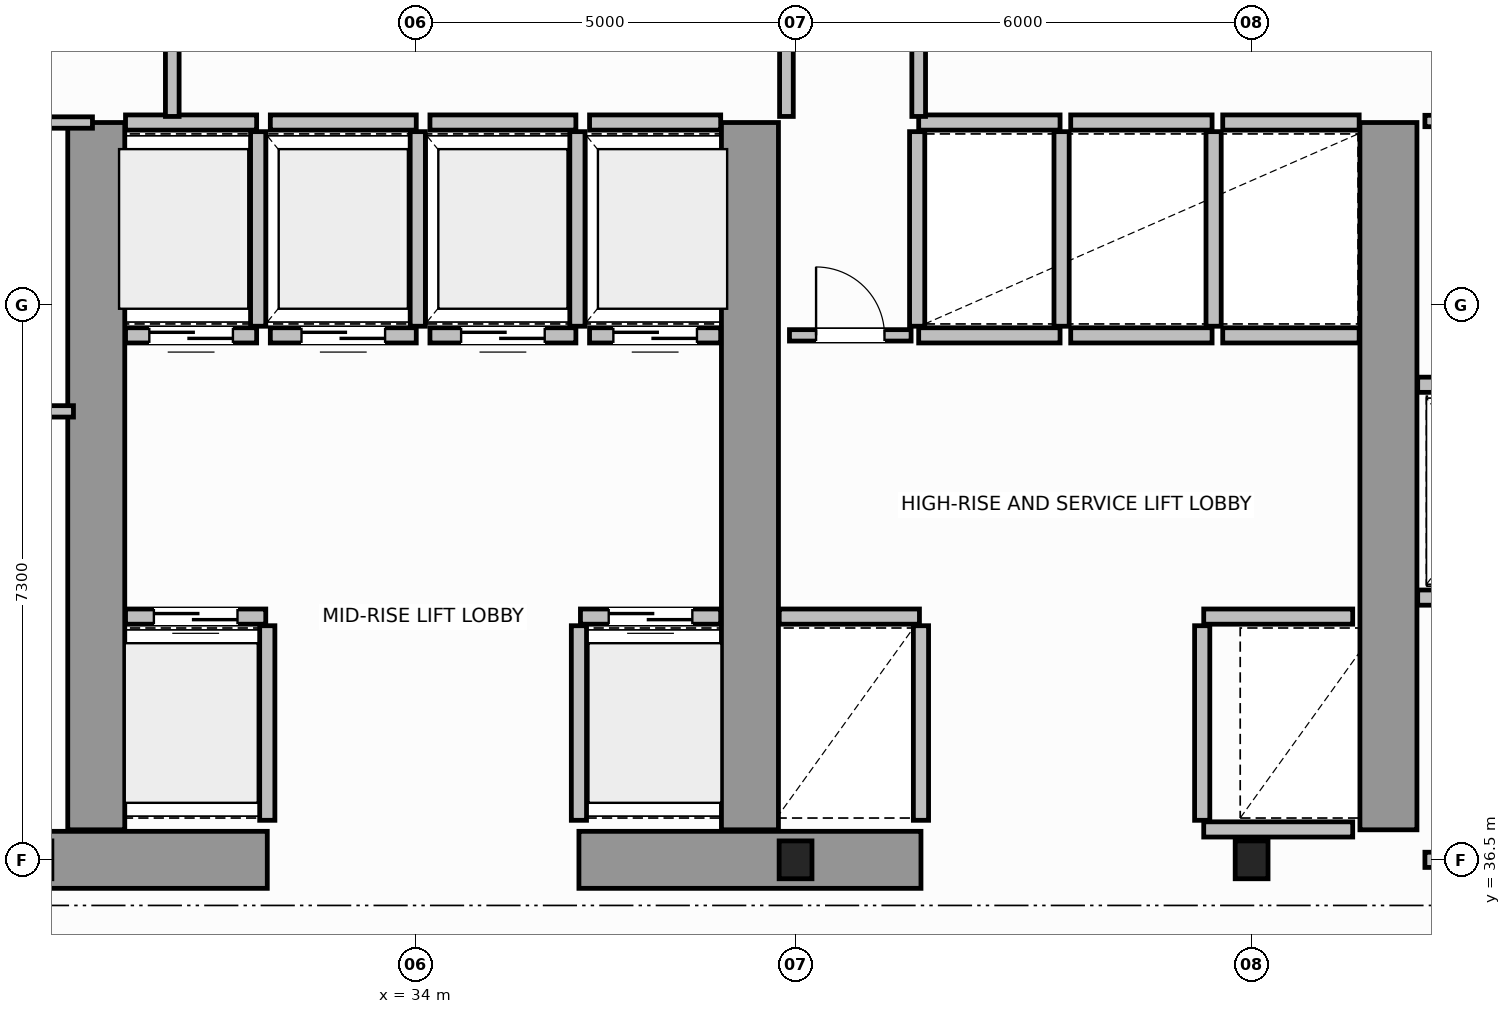
"""IFC4 building model, lengths in metres.
Left out: names, types, materials, properties, quantities, classifications, styles, units other than length and angle.
Written with IfcOpenShell. Run it as: python <this file> out.ifc"""

import sys

from ifc_helpers import new_model, si_unit, direction, frame, frame_2d, origin, origin_2d, place, context, subcontext, project, spatial, rectangle, i_section, extrude, source, transform, mapped, element, fill, save


model = new_model("IFC4")
c1 = context("Model", 3, precision=1e-05, world=origin(), true_north=direction((0.0, 1.0)))
c2 = subcontext(c1, "Body", "Model", "MODEL_VIEW")
j1 = project(units=[si_unit("LENGTHUNIT", "METRE"), si_unit("PLANEANGLEUNIT", "RADIAN")], contexts=[c1])
p1 = place(None, origin())
s1 = spatial("IfcSite", under=j1, at=p1, CompositionType="ELEMENT")
p2 = place(p1, origin())
s2 = spatial("IfcBuilding", under=s1, at=p2, CompositionType="ELEMENT")
p3 = place(p2, frame((0.0, 0.0, 153.8)))
s3 = spatial("IfcBuildingStorey", under=s2, at=p3, CompositionType="ELEMENT", Elevation=153.8)
m1 = source(origin(), c2, "Body", "SweptSolid", [
    extrude(i_section(OverallWidth=0.432, OverallDepth=0.498, WebThickness=0.055, FlangeThickness=0.068, FilletRadius=0.015, at=origin_2d()), origin(), (0.0, 0.0, 1.0), 3.8),
])
for number, where, z_axis, x_axis in (
    (1, (39.0, 36.5, 0.0), (0.0, 0.0, 1.0), (1.0, 0.0, 0.0)),
    (2, (45.0, 36.5, 0.0), (0.0, 0.0, 1.0), (1.0, 0.0, 0.0)),
):
    element("IfcColumn", number, at=place(p3, frame(where, z_axis=z_axis, x_axis=x_axis)), inside=s3, PredefinedType="COLUMN", context=c2, shape_type="MappedRepresentation", body=[
        mapped(m1, transform((0.0, 0.0, 0.0), scale=1.0)),
    ])
for number, where, z_axis, x_axis in (
    (3, (27.55, 36.5, 0.0), (0.0, 0.0, 1.0), (1.0, 0.0, 0.0)),
    (4, (36.15, 36.5, 0.0), (0.0, 0.0, 1.0), (1.0, 0.0, 0.0)),
):
    element("IfcWall", number, at=place(p3, frame(where, z_axis=z_axis, x_axis=x_axis)), inside=s3, PredefinedType="SHEAR", context=c2, shape_type="SweptSolid", body=[
        extrude(rectangle(XDim=4.5, YDim=0.75, at=frame_2d((2.25, 0.0))), origin(), (0.0, 0.0, 1.0), 3.8),
    ])
for number, where, z_axis, x_axis in (
    (5, (29.8, 36.895, 0.0), (0.0, 0.0, 1.0), (0.0, 1.0, 0.0)),
    (6, (38.4, 36.895, 0.0), (0.0, 0.0, 1.0), (0.0, 1.0, 0.0)),
    (7, (46.8, 36.895, 0.0), (0.0, 0.0, 1.0), (0.0, 1.0, 0.0)),
):
    element("IfcWall", number, at=place(p3, frame(where, z_axis=z_axis, x_axis=x_axis)), inside=s3, PredefinedType="SHEAR", context=c2, shape_type="SweptSolid", body=[
        extrude(rectangle(XDim=9.305, YDim=0.75, at=frame_2d((4.652, 0.0))), origin(), (0.0, 0.0, 1.0), 3.8),
    ])
p4 = place(p3, frame((47.28, 36.5, 0.0), z_axis=(0.0, 0.0, 1.0), x_axis=(1.0, 0.0, 0.0)))
e8 = element("IfcWall", 8, at=p4, inside=s3, PredefinedType="SOLIDWALL", context=c2, shape_type="SweptSolid", body=[
    extrude(rectangle(XDim=2.47, YDim=0.2, at=frame_2d((1.235, 0.0))), origin(), (0.0, 0.0, 1.0), 2.37),
])
p5 = place(p4, frame((0.65, 0.0, 0.0)))
e9 = element("IfcOpeningElement", 9, at=p5, cuts=e8, PredefinedType="OPENING", context=c2, shape_type="SweptSolid", body=[
    extrude(rectangle(XDim=1.1, YDim=2.15, at=frame_2d((0.55, 1.075))), frame((0.0, 0.11, 0.0), z_axis=(0.0, -1.0, 0.0), x_axis=(1.0, 0.0, 0.0)), (0.0, 0.0, 1.0), 0.22),
])
p6 = place(p3, frame((30.185, 39.7, 0.0), z_axis=(0.0, 0.0, 1.0), x_axis=(1.0, 0.0, 0.0)))
e10 = element("IfcWall", 10, at=p6, inside=s3, PredefinedType="SOLIDWALL", context=c2, shape_type="SweptSolid", body=[
    extrude(rectangle(XDim=1.845, YDim=0.2, at=frame_2d((0.922, 0.0))), origin(), (0.0, 0.0, 1.0), 3.58),
])
p7 = place(p6, frame((0.373, 0.0, 0.0)))
e11 = element("IfcOpeningElement", 11, at=p7, cuts=e10, PredefinedType="OPENING", context=c2, shape_type="SweptSolid", body=[
    extrude(rectangle(XDim=1.1, YDim=2.15, at=frame_2d((0.55, 1.075))), frame((0.0, 0.11, 0.0), z_axis=(0.0, -1.0, 0.0), x_axis=(1.0, 0.0, 0.0)), (0.0, 0.0, 1.0), 0.22),
])
p8 = place(p3, frame((32.05, 37.02, 0.0), z_axis=(0.0, 0.0, 1.0), x_axis=(0.0, 1.0, 0.0)))
e12 = element("IfcWall", 12, at=p8, inside=s3, PredefinedType="SOLIDWALL", context=c2, shape_type="SweptSolid", body=[
    extrude(rectangle(XDim=2.56, YDim=0.2, at=frame_2d((1.28, 0.0))), origin(), (0.0, 0.0, 1.0), 3.58),
])
p9 = place(p3, frame((36.17, 39.7, 0.0), z_axis=(0.0, 0.0, 1.0), x_axis=(1.0, 0.0, 0.0)))
e13 = element("IfcWall", 13, at=p9, inside=s3, PredefinedType="SOLIDWALL", context=c2, shape_type="SweptSolid", body=[
    extrude(rectangle(XDim=1.845, YDim=0.2, at=frame_2d((0.922, 0.0))), origin(), (0.0, 0.0, 1.0), 3.58),
])
p10 = place(p9, frame((0.372, 0.0, 0.0)))
e14 = element("IfcOpeningElement", 14, at=p10, cuts=e13, PredefinedType="OPENING", context=c2, shape_type="SweptSolid", body=[
    extrude(rectangle(XDim=1.1, YDim=2.15, at=frame_2d((0.55, 1.075))), frame((0.0, 0.11, 0.0), z_axis=(0.0, -1.0, 0.0), x_axis=(1.0, 0.0, 0.0)), (0.0, 0.0, 1.0), 0.22),
])
p11 = place(p3, frame((36.15, 37.02, 0.0), z_axis=(0.0, 0.0, 1.0), x_axis=(0.0, 1.0, 0.0)))
e15 = element("IfcWall", 15, at=p11, inside=s3, PredefinedType="SOLIDWALL", context=c2, shape_type="SweptSolid", body=[
    extrude(rectangle(XDim=2.56, YDim=0.2, at=frame_2d((1.28, 0.0))), origin(), (0.0, 0.0, 1.0), 3.58),
])
p12 = place(p3, frame((30.185, 43.4, 0.0), z_axis=(0.0, 0.0, 1.0), x_axis=(1.0, 0.0, 0.0)))
e16 = element("IfcWall", 16, at=p12, inside=s3, PredefinedType="SOLIDWALL", context=c2, shape_type="SweptSolid", body=[
    extrude(rectangle(XDim=1.725, YDim=0.2, at=frame_2d((0.862, 0.0))), origin(), (0.0, 0.0, 1.0), 3.58),
])
p13 = place(p12, frame((0.313, 0.0, 0.0)))
e17 = element("IfcOpeningElement", 17, at=p13, cuts=e16, PredefinedType="OPENING", context=c2, shape_type="SweptSolid", body=[
    extrude(rectangle(XDim=1.1, YDim=2.15, at=frame_2d((0.55, 1.075))), frame((0.0, 0.11, 0.0), z_axis=(0.0, -1.0, 0.0), x_axis=(1.0, 0.0, 0.0)), (0.0, 0.0, 1.0), 0.22),
])
p14 = place(p3, frame((30.185, 46.2, 0.0), z_axis=(0.0, 0.0, 1.0), x_axis=(1.0, 0.0, 0.0)))
e18 = element("IfcWall", 18, at=p14, inside=s3, PredefinedType="SOLIDWALL", context=c2, shape_type="SweptSolid", body=[
    extrude(rectangle(XDim=1.725, YDim=0.2, at=frame_2d((0.862, 0.0))), origin(), (0.0, 0.0, 1.0), 3.58),
])
p15 = place(p3, frame((31.93, 43.52, 0.0), z_axis=(0.0, 0.0, 1.0), x_axis=(0.0, 1.0, 0.0)))
e19 = element("IfcWall", 19, at=p15, inside=s3, PredefinedType="SOLIDWALL", context=c2, shape_type="SweptSolid", body=[
    extrude(rectangle(XDim=2.56, YDim=0.2, at=frame_2d((1.28, 0.0))), origin(), (0.0, 0.0, 1.0), 3.58),
])
p16 = place(p3, frame((32.09, 43.4, 0.0), z_axis=(0.0, 0.0, 1.0), x_axis=(1.0, 0.0, 0.0)))
e20 = element("IfcWall", 20, at=p16, inside=s3, PredefinedType="SOLIDWALL", context=c2, shape_type="SweptSolid", body=[
    extrude(rectangle(XDim=1.92, YDim=0.2, at=frame_2d((0.96, 0.0))), origin(), (0.0, 0.0, 1.0), 3.58),
])
p17 = place(p16, frame((0.41, 0.0, 0.0)))
e21 = element("IfcOpeningElement", 21, at=p17, cuts=e20, PredefinedType="OPENING", context=c2, shape_type="SweptSolid", body=[
    extrude(rectangle(XDim=1.1, YDim=2.15, at=frame_2d((0.55, 1.075))), frame((0.0, 0.11, 0.0), z_axis=(0.0, -1.0, 0.0), x_axis=(1.0, 0.0, 0.0)), (0.0, 0.0, 1.0), 0.22),
])
p18 = place(p3, frame((32.09, 46.2, 0.0), z_axis=(0.0, 0.0, 1.0), x_axis=(1.0, 0.0, 0.0)))
e22 = element("IfcWall", 22, at=p18, inside=s3, PredefinedType="SOLIDWALL", context=c2, shape_type="SweptSolid", body=[
    extrude(rectangle(XDim=1.92, YDim=0.2, at=frame_2d((0.96, 0.0))), origin(), (0.0, 0.0, 1.0), 3.58),
])
p19 = place(p3, frame((34.03, 43.52, 0.0), z_axis=(0.0, 0.0, 1.0), x_axis=(0.0, 1.0, 0.0)))
e23 = element("IfcWall", 23, at=p19, inside=s3, PredefinedType="SOLIDWALL", context=c2, shape_type="SweptSolid", body=[
    extrude(rectangle(XDim=2.56, YDim=0.2, at=frame_2d((1.28, 0.0))), origin(), (0.0, 0.0, 1.0), 3.58),
])
p20 = place(p3, frame((34.19, 43.4, 0.0), z_axis=(0.0, 0.0, 1.0), x_axis=(1.0, 0.0, 0.0)))
e24 = element("IfcWall", 24, at=p20, inside=s3, PredefinedType="SOLIDWALL", context=c2, shape_type="SweptSolid", body=[
    extrude(rectangle(XDim=1.92, YDim=0.2, at=frame_2d((0.96, 0.0))), origin(), (0.0, 0.0, 1.0), 3.58),
])
p21 = place(p20, frame((0.41, 0.0, 0.0)))
e25 = element("IfcOpeningElement", 25, at=p21, cuts=e24, PredefinedType="OPENING", context=c2, shape_type="SweptSolid", body=[
    extrude(rectangle(XDim=1.1, YDim=2.15, at=frame_2d((0.55, 1.075))), frame((0.0, 0.11, 0.0), z_axis=(0.0, -1.0, 0.0), x_axis=(1.0, 0.0, 0.0)), (0.0, 0.0, 1.0), 0.22),
])
p22 = place(p3, frame((34.19, 46.2, 0.0), z_axis=(0.0, 0.0, 1.0), x_axis=(1.0, 0.0, 0.0)))
e26 = element("IfcWall", 26, at=p22, inside=s3, PredefinedType="SOLIDWALL", context=c2, shape_type="SweptSolid", body=[
    extrude(rectangle(XDim=1.92, YDim=0.2, at=frame_2d((0.96, 0.0))), origin(), (0.0, 0.0, 1.0), 3.58),
])
p23 = place(p3, frame((36.13, 43.52, 0.0), z_axis=(0.0, 0.0, 1.0), x_axis=(0.0, 1.0, 0.0)))
e27 = element("IfcWall", 27, at=p23, inside=s3, PredefinedType="SOLIDWALL", context=c2, shape_type="SweptSolid", body=[
    extrude(rectangle(XDim=2.56, YDim=0.2, at=frame_2d((1.28, 0.0))), origin(), (0.0, 0.0, 1.0), 3.58),
])
p24 = place(p3, frame((36.29, 43.4, 0.0), z_axis=(0.0, 0.0, 1.0), x_axis=(1.0, 0.0, 0.0)))
e28 = element("IfcWall", 28, at=p24, inside=s3, PredefinedType="SOLIDWALL", context=c2, shape_type="SweptSolid", body=[
    extrude(rectangle(XDim=1.725, YDim=0.2, at=frame_2d((0.862, 0.0))), origin(), (0.0, 0.0, 1.0), 3.58),
])
p25 = place(p24, frame((0.313, 0.0, 0.0)))
e29 = element("IfcOpeningElement", 29, at=p25, cuts=e28, PredefinedType="OPENING", context=c2, shape_type="SweptSolid", body=[
    extrude(rectangle(XDim=1.1, YDim=2.15, at=frame_2d((0.55, 1.075))), frame((0.0, 0.11, 0.0), z_axis=(0.0, -1.0, 0.0), x_axis=(1.0, 0.0, 0.0)), (0.0, 0.0, 1.0), 0.22),
])
p26 = place(p3, frame((36.29, 46.2, 0.0), z_axis=(0.0, 0.0, 1.0), x_axis=(1.0, 0.0, 0.0)))
e30 = element("IfcWall", 30, at=p26, inside=s3, PredefinedType="SOLIDWALL", context=c2, shape_type="SweptSolid", body=[
    extrude(rectangle(XDim=1.725, YDim=0.2, at=frame_2d((0.862, 0.0))), origin(), (0.0, 0.0, 1.0), 3.58),
])
p27 = place(p3, frame((38.785, 39.7, 0.0), z_axis=(0.0, 0.0, 1.0), x_axis=(1.0, 0.0, 0.0)))
e31 = element("IfcWall", 31, at=p27, inside=s3, PredefinedType="SOLIDWALL", context=c2, shape_type="SweptSolid", body=[
    extrude(rectangle(XDim=1.845, YDim=0.2, at=frame_2d((0.922, 0.0))), origin(), (0.0, 0.0, 1.0), 3.58),
])
p28 = place(p3, frame((40.65, 37.02, 0.0), z_axis=(0.0, 0.0, 1.0), x_axis=(0.0, 1.0, 0.0)))
e32 = element("IfcWall", 32, at=p28, inside=s3, PredefinedType="SOLIDWALL", context=c2, shape_type="SweptSolid", body=[
    extrude(rectangle(XDim=2.56, YDim=0.2, at=frame_2d((1.28, 0.0))), origin(), (0.0, 0.0, 1.0), 3.58),
])
p29 = place(p3, frame((44.37, 39.7, 0.0), z_axis=(0.0, 0.0, 1.0), x_axis=(1.0, 0.0, 0.0)))
e33 = element("IfcWall", 33, at=p29, inside=s3, PredefinedType="SOLIDWALL", context=c2, shape_type="SweptSolid", body=[
    extrude(rectangle(XDim=1.96, YDim=0.2, at=frame_2d((0.98, 0.0))), origin(), (0.0, 0.0, 1.0), 3.58),
])
p30 = place(p3, frame((44.37, 36.9, 0.0), z_axis=(0.0, 0.0, 1.0), x_axis=(1.0, 0.0, 0.0)))
e34 = element("IfcWall", 34, at=p30, inside=s3, PredefinedType="SOLIDWALL", context=c2, shape_type="SweptSolid", body=[
    extrude(rectangle(XDim=1.96, YDim=0.2, at=frame_2d((0.98, 0.0))), origin(), (0.0, 0.0, 1.0), 2.37),
])
p31 = place(p3, frame((44.35, 37.02, 0.0), z_axis=(0.0, 0.0, 1.0), x_axis=(0.0, 1.0, 0.0)))
e35 = element("IfcWall", 35, at=p31, inside=s3, PredefinedType="SOLIDWALL", context=c2, shape_type="SweptSolid", body=[
    extrude(rectangle(XDim=2.56, YDim=0.2, at=frame_2d((1.28, 0.0))), origin(), (0.0, 0.0, 1.0), 3.58),
])
for number, where, z_axis, x_axis in (
    (36, (40.62, 43.4, 0.0), (0.0, 0.0, 1.0), (1.0, 0.0, 0.0)),
    (37, (40.62, 46.2, 0.0), (0.0, 0.0, 1.0), (1.0, 0.0, 0.0)),
):
    element("IfcWall", number, at=place(p3, frame(where, z_axis=z_axis, x_axis=x_axis)), inside=s3, PredefinedType="SOLIDWALL", context=c2, shape_type="SweptSolid", body=[
        extrude(rectangle(XDim=1.86, YDim=0.2, at=frame_2d((0.93, 0.0))), origin(), (0.0, 0.0, 1.0), 3.58),
    ])
for number, where, z_axis, x_axis in (
    (38, (40.6, 43.52, 0.0), (0.0, 0.0, 1.0), (0.0, 1.0, 0.0)),
    (39, (42.5, 43.52, 0.0), (0.0, 0.0, 1.0), (0.0, 1.0, 0.0)),
):
    element("IfcWall", number, at=place(p3, frame(where, z_axis=z_axis, x_axis=x_axis)), inside=s3, PredefinedType="SOLIDWALL", context=c2, shape_type="SweptSolid", body=[
        extrude(rectangle(XDim=2.56, YDim=0.2, at=frame_2d((1.28, 0.0))), origin(), (0.0, 0.0, 1.0), 3.58),
    ])
for number, where, z_axis, x_axis in (
    (40, (42.62, 43.4, 0.0), (0.0, 0.0, 1.0), (1.0, 0.0, 0.0)),
    (41, (42.62, 46.2, 0.0), (0.0, 0.0, 1.0), (1.0, 0.0, 0.0)),
):
    element("IfcWall", number, at=place(p3, frame(where, z_axis=z_axis, x_axis=x_axis)), inside=s3, PredefinedType="SOLIDWALL", context=c2, shape_type="SweptSolid", body=[
        extrude(rectangle(XDim=1.86, YDim=0.2, at=frame_2d((0.93, 0.0))), origin(), (0.0, 0.0, 1.0), 3.58),
    ])
p32 = place(p3, frame((44.5, 43.52, 0.0), z_axis=(0.0, 0.0, 1.0), x_axis=(0.0, 1.0, 0.0)))
e42 = element("IfcWall", 42, at=p32, inside=s3, PredefinedType="SOLIDWALL", context=c2, shape_type="SweptSolid", body=[
    extrude(rectangle(XDim=2.56, YDim=0.2, at=frame_2d((1.28, 0.0))), origin(), (0.0, 0.0, 1.0), 3.58),
])
for number, where, z_axis, x_axis in (
    (43, (44.62, 43.4, 0.0), (0.0, 0.0, 1.0), (1.0, 0.0, 0.0)),
    (44, (44.62, 46.2, 0.0), (0.0, 0.0, 1.0), (1.0, 0.0, 0.0)),
):
    element("IfcWall", number, at=place(p3, frame(where, z_axis=z_axis, x_axis=x_axis)), inside=s3, PredefinedType="SOLIDWALL", context=c2, shape_type="SweptSolid", body=[
        extrude(rectangle(XDim=1.795, YDim=0.2, at=frame_2d((0.897, 0.0))), origin(), (0.0, 0.0, 1.0), 3.58),
    ])
p33 = place(p3, frame((47.185, 39.95, 0.0), z_axis=(0.0, 0.0, 1.0), x_axis=(1.0, 0.0, 0.0)))
e45 = element("IfcWall", 45, at=p33, inside=s3, PredefinedType="SOLIDWALL", context=c2, shape_type="SweptSolid", body=[
    extrude(rectangle(XDim=2.145, YDim=0.2, at=frame_2d((1.073, 0.0))), origin(), (0.0, 0.0, 1.0), 3.58),
])
p34 = place(p33, frame((0.522, 0.0, 0.0)))
e46 = element("IfcOpeningElement", 46, at=p34, cuts=e45, PredefinedType="OPENING", context=c2, shape_type="SweptSolid", body=[
    extrude(rectangle(XDim=1.1, YDim=2.15, at=frame_2d((0.55, 1.075))), frame((0.0, 0.11, 0.0), z_axis=(0.0, -1.0, 0.0), x_axis=(1.0, 0.0, 0.0)), (0.0, 0.0, 1.0), 0.22),
])
p35 = place(p3, frame((47.185, 42.75, 0.0), z_axis=(0.0, 0.0, 1.0), x_axis=(1.0, 0.0, 0.0)))
e47 = element("IfcWall", 47, at=p35, inside=s3, PredefinedType="SOLIDWALL", context=c2, shape_type="SweptSolid", body=[
    extrude(rectangle(XDim=2.145, YDim=0.2, at=frame_2d((1.073, 0.0))), origin(), (0.0, 0.0, 1.0), 3.58),
])
p36 = place(p3, frame((21.25, 46.2, 0.0), z_axis=(0.0, 0.0, 1.0), x_axis=(1.0, 0.0, 0.0)))
e48 = element("IfcWall", 48, at=p36, inside=s3, PredefinedType="PARTITIONING", context=c2, shape_type="SweptSolid", body=[
    extrude(rectangle(XDim=8.5, YDim=0.15, at=frame_2d((4.25, 0.0))), origin(), (0.0, 0.0, 1.0), 3.58),
])
p37 = place(p3, frame((21.5, 42.4, 0.0), z_axis=(0.0, 0.0, 1.0), x_axis=(1.0, 0.0, 0.0)))
e49 = element("IfcWall", 49, at=p37, inside=s3, PredefinedType="PARTITIONING", context=c2, shape_type="SweptSolid", body=[
    extrude(rectangle(XDim=8.0, YDim=0.15, at=frame_2d((4.0, 0.0))), origin(), (0.0, 0.0, 1.0), 3.58),
])
p38 = place(p37, frame((3.4, 0.0, 0.0)))
e50 = element("IfcOpeningElement", 50, at=p38, cuts=e49, PredefinedType="OPENING", context=c2, shape_type="SweptSolid", body=[
    extrude(rectangle(XDim=0.9, YDim=2.1, at=frame_2d((0.45, 1.05))), frame((0.0, 0.085, 0.0), z_axis=(0.0, -1.0, 0.0), x_axis=(1.0, 0.0, 0.0)), (0.0, 0.0, 1.0), 0.17),
])
p39 = place(p3, frame((47.28, 46.22, 0.0), z_axis=(0.0, 0.0, 1.0), x_axis=(1.0, 0.0, 0.0)))
e51 = element("IfcWall", 51, at=p39, inside=s3, PredefinedType="PARTITIONING", context=c2, shape_type="SweptSolid", body=[
    extrude(rectangle(XDim=2.1, YDim=0.15, at=frame_2d((1.05, 0.0))), origin(), (0.0, 0.0, 1.0), 3.58),
])
p40 = place(p39, frame((0.55, 0.0, 0.0)))
e52 = element("IfcOpeningElement", 52, at=p40, cuts=e51, PredefinedType="OPENING", context=c2, shape_type="SweptSolid", body=[
    extrude(rectangle(XDim=0.9, YDim=2.1, at=frame_2d((0.45, 1.05))), frame((0.0, 0.085, 0.0), z_axis=(0.0, -1.0, 0.0), x_axis=(1.0, 0.0, 0.0)), (0.0, 0.0, 1.0), 0.17),
])
p41 = place(p3, frame((38.92, 43.4, 0.0), z_axis=(0.0, 0.0, 1.0), x_axis=(1.0, 0.0, 0.0)))
e53 = element("IfcWall", 53, at=p41, inside=s3, PredefinedType="PARTITIONING", context=c2, shape_type="SweptSolid", body=[
    extrude(rectangle(XDim=1.6, YDim=0.15, at=frame_2d((0.8, 0.0))), origin(), (0.0, 0.0, 1.0), 3.58),
])
p42 = place(p41, frame((0.35, 0.0, 0.0)))
e54 = element("IfcOpeningElement", 54, at=p42, cuts=e53, PredefinedType="OPENING", context=c2, shape_type="SweptSolid", body=[
    extrude(rectangle(XDim=0.9, YDim=2.1, at=frame_2d((0.45, 1.05))), frame((0.0, 0.085, 0.0), z_axis=(0.0, -1.0, 0.0), x_axis=(1.0, 0.0, 0.0)), (0.0, 0.0, 1.0), 0.17),
])
for number, where, z_axis, x_axis in (
    (55, (30.8, 46.28, 0.0), (0.0, 0.0, 1.0), (0.0, 1.0, 0.0)),
    (56, (38.88, 46.28, 0.0), (0.0, 0.0, 1.0), (0.0, 1.0, 0.0)),
):
    element("IfcWall", number, at=place(p3, frame(where, z_axis=z_axis, x_axis=x_axis)), inside=s3, PredefinedType="PLUMBINGWALL", context=c2, shape_type="SweptSolid", body=[
        extrude(rectangle(XDim=1.94, YDim=0.18, at=frame_2d((0.97, 0.0))), origin(), (0.0, 0.0, 1.0), 3.58),
    ])
p43 = place(p3, frame((40.62, 46.28, 0.0), z_axis=(0.0, 0.0, 1.0), x_axis=(0.0, 1.0, 0.0)))
e57 = element("IfcWall", 57, at=p43, inside=s3, PredefinedType="PLUMBINGWALL", context=c2, shape_type="SweptSolid", body=[
    extrude(rectangle(XDim=2.0, YDim=0.18, at=frame_2d((1.0, 0.0))), origin(), (0.0, 0.0, 1.0), 3.58),
])
m2 = source(origin(), c2, "Body", "SweptSolid", [
    extrude(rectangle(XDim=1.1, YDim=2.15, at=frame_2d((0.55, 1.075))), frame((0.0, 0.025, 0.0), z_axis=(0.0, -1.0, 0.0), x_axis=(1.0, 0.0, 0.0)), (0.0, 0.0, 1.0), 0.05),
])
p44 = place(p7, origin())
e58 = element("IfcDoor", 58, at=p44, inside=s3, OperationType="DOUBLE_DOOR_SLIDING", PredefinedType="DOOR", context=c2, shape_type="MappedRepresentation", body=[
    mapped(m2, transform((0.0, 0.0, 0.0), scale=1.0)),
])
fill(e11, e58)
p45 = place(p10, origin())
e59 = element("IfcDoor", 59, at=p45, inside=s3, OperationType="DOUBLE_DOOR_SLIDING", PredefinedType="DOOR", context=c2, shape_type="MappedRepresentation", body=[
    mapped(m2, transform((0.0, 0.0, 0.0), scale=1.0)),
])
fill(e14, e59)
p46 = place(p13, origin())
e60 = element("IfcDoor", 60, at=p46, inside=s3, OperationType="DOUBLE_DOOR_SLIDING", PredefinedType="DOOR", context=c2, shape_type="MappedRepresentation", body=[
    mapped(m2, transform((0.0, 0.0, 0.0), scale=1.0)),
])
fill(e17, e60)
p47 = place(p17, origin())
e61 = element("IfcDoor", 61, at=p47, inside=s3, OperationType="DOUBLE_DOOR_SLIDING", PredefinedType="DOOR", context=c2, shape_type="MappedRepresentation", body=[
    mapped(m2, transform((0.0, 0.0, 0.0), scale=1.0)),
])
fill(e21, e61)
p48 = place(p21, origin())
e62 = element("IfcDoor", 62, at=p48, inside=s3, OperationType="DOUBLE_DOOR_SLIDING", PredefinedType="DOOR", context=c2, shape_type="MappedRepresentation", body=[
    mapped(m2, transform((0.0, 0.0, 0.0), scale=1.0)),
])
fill(e25, e62)
p49 = place(p25, origin())
e63 = element("IfcDoor", 63, at=p49, inside=s3, OperationType="DOUBLE_DOOR_SLIDING", PredefinedType="DOOR", context=c2, shape_type="MappedRepresentation", body=[
    mapped(m2, transform((0.0, 0.0, 0.0), scale=1.0)),
])
fill(e29, e63)
m3 = source(origin(), c2, "Body", "SweptSolid", [
    extrude(rectangle(XDim=0.9, YDim=2.1, at=frame_2d((0.45, 1.05))), frame((0.0, 0.025, 0.0), z_axis=(0.0, -1.0, 0.0), x_axis=(1.0, 0.0, 0.0)), (0.0, 0.0, 1.0), 0.05),
])
p50 = place(p42, origin())
e64 = element("IfcDoor", 64, at=p50, inside=s3, OperationType="SINGLE_SWING_LEFT", PredefinedType="DOOR", context=c2, shape_type="MappedRepresentation", body=[
    mapped(m3, transform((0.0, 0.0, 0.0), scale=1.0)),
])
fill(e54, e64)
save(model, sys.argv[1])
